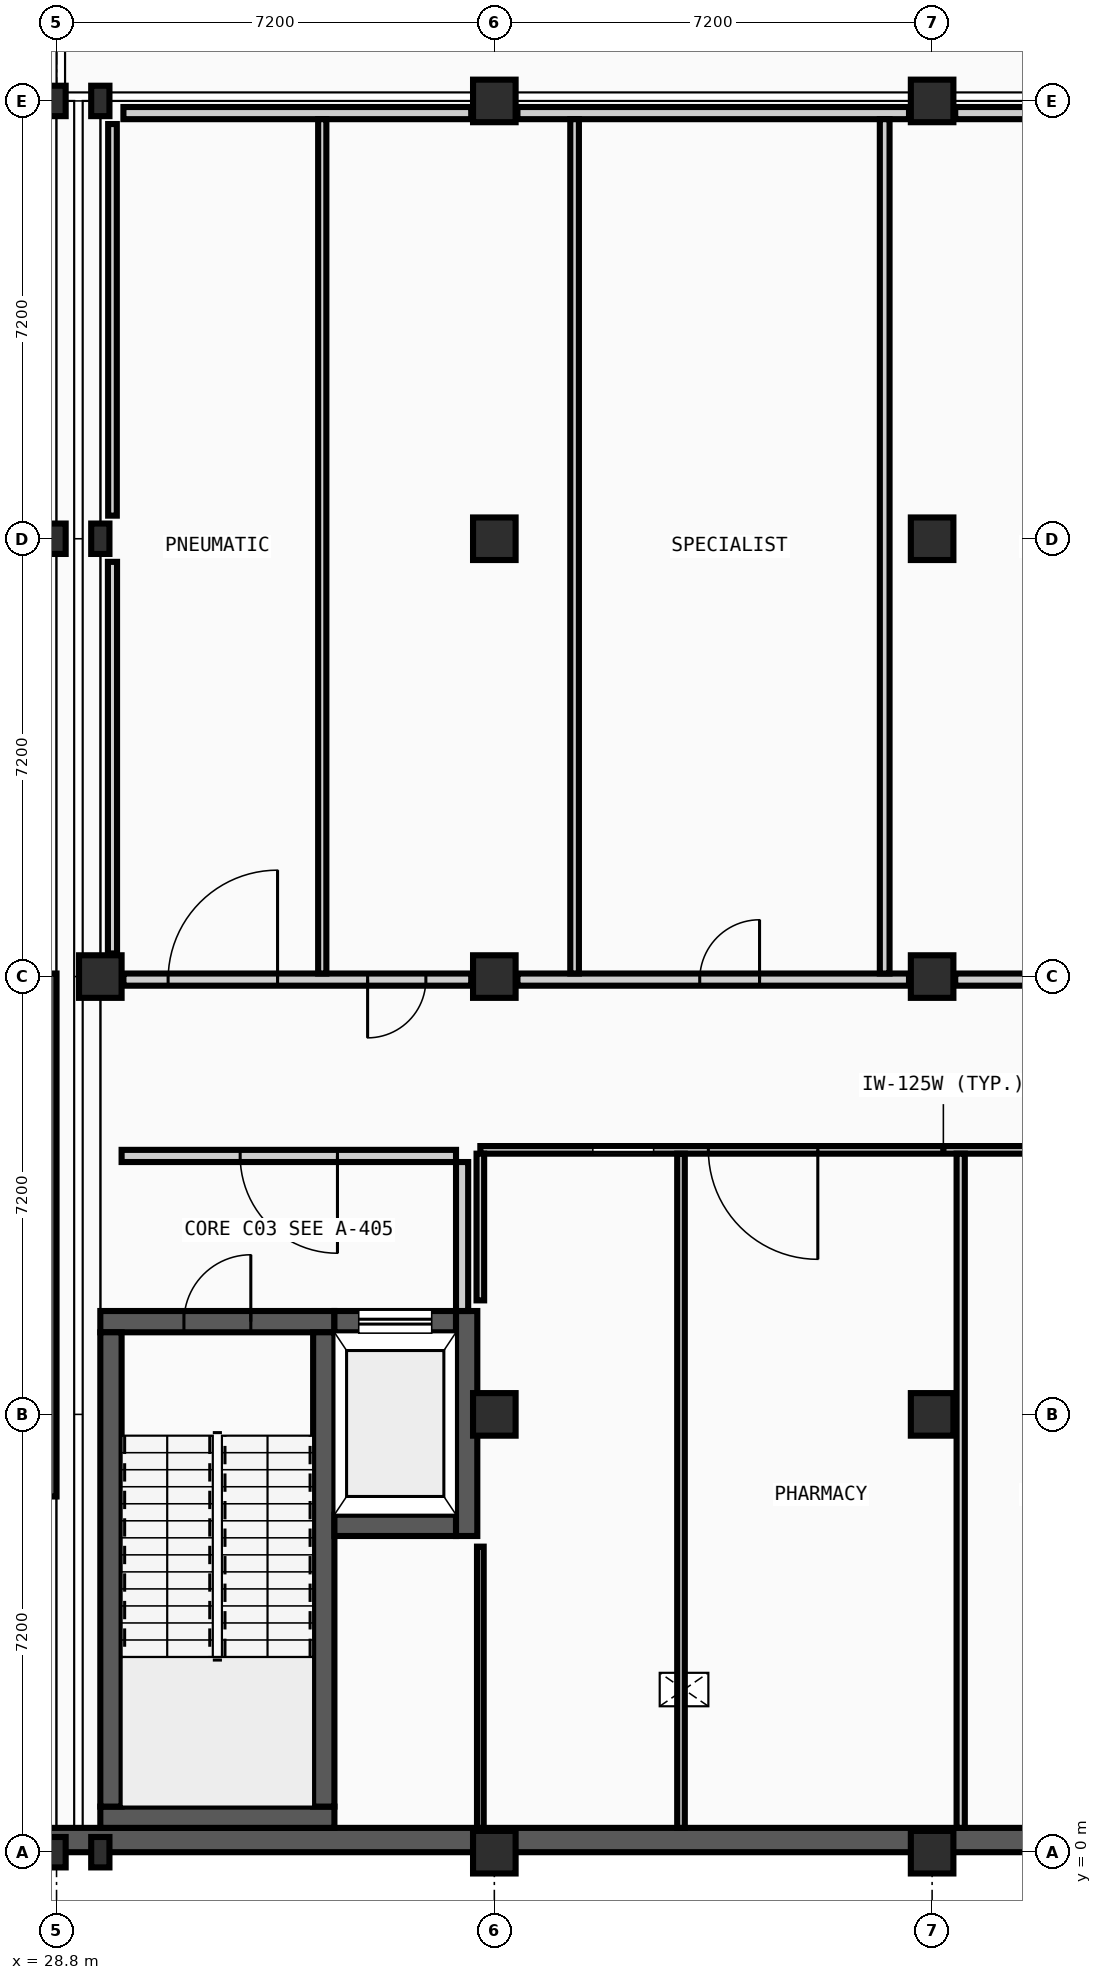
"""IFC4 building model, lengths in metres.
Left out: names, types, materials, properties, quantities, classifications, styles, units other than length and angle.
Written with IfcOpenShell. Run it as: python <this file> out.ifc"""

import sys

from ifc_helpers import new_model, si_unit, direction, frame, frame_2d, origin, origin_2d, place, context, subcontext, project, spatial, rectangle, i_section, extrude, element, fill, save


model = new_model("IFC4")
c1 = context("Model", 3, precision=1e-05, world=origin(), true_north=direction((0.0, 1.0)))
c2 = subcontext(c1, "Body", "Model", "MODEL_VIEW")
j1 = project(units=[si_unit("LENGTHUNIT", "METRE"), si_unit("PLANEANGLEUNIT", "RADIAN")], contexts=[c1])
p1 = place(None, origin())
s1 = spatial("IfcSite", under=j1, at=p1, CompositionType="ELEMENT")
p2 = place(p1, origin())
s2 = spatial("IfcBuilding", under=s1, at=p2, CompositionType="ELEMENT")
p3 = place(p2, frame((0.0, 0.0, -4.8)))
s3 = spatial("IfcBuildingStorey", under=s2, at=p3, CompositionType="ELEMENT", Elevation=-4.8)
for number, where, z_axis, x_axis in (
    (1, (28.8, 0.0, 0.0), (0.0, 0.0, 1.0), (1.0, 0.0, 0.0)),
    (2, (28.8, 21.6, 0.0), (0.0, 0.0, 1.0), (1.0, 0.0, 0.0)),
    (3, (28.8, 28.8, 0.0), (0.0, 0.0, 1.0), (1.0, 0.0, 0.0)),
    (4, (29.52, 0.0, 0.0), (0.0, 0.0, 1.0), (1.0, 0.0, 0.0)),
):
    element("IfcColumn", number, at=place(p3, frame(where, z_axis=z_axis, x_axis=x_axis)), inside=s3, PredefinedType="COLUMN", context=c2, shape_type="SweptSolid", body=[
        extrude(i_section(OverallWidth=0.3, OverallDepth=0.5, WebThickness=0.014, FlangeThickness=0.028, FilletRadius=0.027, at=origin_2d()), origin(), (0.0, 0.0, 1.0), 4.8),
    ])
p4 = place(p3, frame((29.52, 14.4, 0.0), z_axis=(0.0, 0.0, 1.0), x_axis=(1.0, 0.0, 0.0)))
e5 = element("IfcColumn", 5, at=p4, inside=s3, PredefinedType="COLUMN", context=c2, shape_type="SweptSolid", body=[
    extrude(rectangle(XDim=0.7, YDim=0.7, at=origin_2d()), origin(), (0.0, 0.0, 1.0), 4.8),
])
for number, where, z_axis, x_axis in (
    (6, (29.52, 21.6, 0.0), (0.0, 0.0, 1.0), (1.0, 0.0, 0.0)),
    (7, (29.52, 28.8, 0.0), (0.0, 0.0, 1.0), (1.0, 0.0, 0.0)),
):
    element("IfcColumn", number, at=place(p3, frame(where, z_axis=z_axis, x_axis=x_axis)), inside=s3, PredefinedType="COLUMN", context=c2, shape_type="SweptSolid", body=[
        extrude(i_section(OverallWidth=0.3, OverallDepth=0.5, WebThickness=0.014, FlangeThickness=0.028, FilletRadius=0.027, at=origin_2d()), origin(), (0.0, 0.0, 1.0), 4.8),
    ])
for number, where, z_axis, x_axis in (
    (8, (36.0, 0.0, 0.0), (0.0, 0.0, 1.0), (1.0, 0.0, 0.0)),
    (9, (36.0, 7.2, 0.0), (0.0, 0.0, 1.0), (1.0, 0.0, 0.0)),
    (10, (36.0, 14.4, 0.0), (0.0, 0.0, 1.0), (1.0, 0.0, 0.0)),
    (11, (36.0, 21.6, 0.0), (0.0, 0.0, 1.0), (1.0, 0.0, 0.0)),
    (12, (36.0, 28.8, 0.0), (0.0, 0.0, 1.0), (1.0, 0.0, 0.0)),
    (13, (43.2, 0.0, 0.0), (0.0, 0.0, 1.0), (1.0, 0.0, 0.0)),
    (14, (43.2, 7.2, 0.0), (0.0, 0.0, 1.0), (1.0, 0.0, 0.0)),
    (15, (43.2, 14.4, 0.0), (0.0, 0.0, 1.0), (1.0, 0.0, 0.0)),
    (16, (43.2, 21.6, 0.0), (0.0, 0.0, 1.0), (1.0, 0.0, 0.0)),
    (17, (43.2, 28.8, 0.0), (0.0, 0.0, 1.0), (1.0, 0.0, 0.0)),
):
    element("IfcColumn", number, at=place(p3, frame(where, z_axis=z_axis, x_axis=x_axis)), inside=s3, PredefinedType="COLUMN", context=c2, shape_type="SweptSolid", body=[
        extrude(rectangle(XDim=0.7, YDim=0.7, at=origin_2d()), origin(), (0.0, 0.0, 1.0), 4.8),
    ])
p5 = place(p3, frame((0.0, 0.2, 0.0), z_axis=(0.0, 0.0, 1.0), x_axis=(1.0, 0.0, 0.0)))
e18 = element("IfcWall", 18, at=p5, inside=s3, PredefinedType="USERDEFINED", context=c2, shape_type="SweptSolid", body=[
    extrude(rectangle(XDim=86.4, YDim=0.4, at=frame_2d((43.2, 0.0))), origin(), (0.0, 0.0, 1.0), 4.545),
])
p6 = place(p3, frame((28.6, 5.85, 0.0), z_axis=(0.0, 0.0, 1.0), x_axis=(0.0, 1.0, 0.0)))
e19 = element("IfcWall", 19, at=p6, inside=s3, PredefinedType="SHEAR", context=c2, shape_type="SweptSolid", body=[
    extrude(rectangle(XDim=8.6, YDim=0.4, at=frame_2d((4.3, 0.0))), origin(), (0.0, 0.0, 1.0), 4.545),
])
p7 = place(p3, frame((29.52, 0.575, 0.0), z_axis=(0.0, 0.0, 1.0), x_axis=(1.0, 0.0, 0.0)))
e20 = element("IfcWall", 20, at=p7, inside=s3, PredefinedType="SHEAR", context=c2, shape_type="SweptSolid", body=[
    extrude(rectangle(XDim=3.85, YDim=0.35, at=frame_2d((1.925, 0.0))), origin(), (0.0, 0.0, 1.0), 4.545),
])
p8 = place(p3, frame((29.52, 8.725, 0.0), z_axis=(0.0, 0.0, 1.0), x_axis=(1.0, 0.0, 0.0)))
e21 = element("IfcWall", 21, at=p8, inside=s3, PredefinedType="SHEAR", context=c2, shape_type="SweptSolid", body=[
    extrude(rectangle(XDim=3.85, YDim=0.35, at=frame_2d((1.925, 0.0))), origin(), (0.0, 0.0, 1.0), 4.545),
])
p9 = place(p8, frame((1.375, 0.0, 0.0)))
e22 = element("IfcOpeningElement", 22, at=p9, cuts=e21, PredefinedType="OPENING", context=c2, shape_type="SweptSolid", body=[
    extrude(rectangle(XDim=1.1, YDim=2.15, at=frame_2d((0.55, 1.075))), frame((0.0, 0.185, 0.0), z_axis=(0.0, -1.0, 0.0), x_axis=(1.0, 0.0, 0.0)), (0.0, 0.0, 1.0), 0.37),
])
for number, where, z_axis, x_axis in (
    (23, (29.695, 0.75, 0.0), (0.0, 0.0, 1.0), (0.0, 1.0, 0.0)),
    (24, (33.195, 0.75, 0.0), (0.0, 0.0, 1.0), (0.0, 1.0, 0.0)),
):
    element("IfcWall", number, at=place(p3, frame(where, z_axis=z_axis, x_axis=x_axis)), inside=s3, PredefinedType="SHEAR", context=c2, shape_type="SweptSolid", body=[
        extrude(rectangle(XDim=7.8, YDim=0.35, at=frame_2d((3.9, 0.0))), origin(), (0.0, 0.0, 1.0), 4.545),
    ])
p10 = place(p3, frame((33.37, 5.375, 0.0), z_axis=(0.0, 0.0, 1.0), x_axis=(1.0, 0.0, 0.0)))
e25 = element("IfcWall", 25, at=p10, inside=s3, PredefinedType="SHEAR", context=c2, shape_type="SweptSolid", body=[
    extrude(rectangle(XDim=2.0, YDim=0.35, at=frame_2d((1.0, 0.0))), origin(), (0.0, 0.0, 1.0), 4.545),
])
p11 = place(p3, frame((33.37, 8.725, 0.0), z_axis=(0.0, 0.0, 1.0), x_axis=(1.0, 0.0, 0.0)))
e26 = element("IfcWall", 26, at=p11, inside=s3, PredefinedType="SHEAR", context=c2, shape_type="SweptSolid", body=[
    extrude(rectangle(XDim=2.0, YDim=0.35, at=frame_2d((1.0, 0.0))), origin(), (0.0, 0.0, 1.0), 4.545),
])
p12 = place(p11, frame((0.4, 0.0, 0.0)))
e27 = element("IfcOpeningElement", 27, at=p12, cuts=e26, PredefinedType="OPENING", context=c2, shape_type="SweptSolid", body=[
    extrude(rectangle(XDim=1.2, YDim=2.2, at=frame_2d((0.6, 1.1))), frame((0.0, 0.185, 0.0), z_axis=(0.0, -1.0, 0.0), x_axis=(1.0, 0.0, 0.0)), (0.0, 0.0, 1.0), 0.37),
])
p13 = place(p3, frame((35.545, 5.2, 0.0), z_axis=(0.0, 0.0, 1.0), x_axis=(0.0, 1.0, 0.0)))
e28 = element("IfcWall", 28, at=p13, inside=s3, PredefinedType="SHEAR", context=c2, shape_type="SweptSolid", body=[
    extrude(rectangle(XDim=3.7, YDim=0.35, at=frame_2d((1.85, 0.0))), origin(), (0.0, 0.0, 1.0), 4.545),
])
p14 = place(p3, frame((29.87, 11.45, 0.0), z_axis=(0.0, 0.0, 1.0), x_axis=(1.0, 0.0, 0.0)))
e29 = element("IfcWall", 29, at=p14, inside=s3, PredefinedType="PARTITIONING", context=c2, shape_type="SweptSolid", body=[
    extrude(rectangle(XDim=5.5, YDim=0.2, at=frame_2d((2.75, 0.0))), origin(), (0.0, 0.0, 1.0), 4.545),
])
p15 = place(p14, frame((1.95, 0.0, 0.0)))
e30 = element("IfcOpeningElement", 30, at=p15, cuts=e29, PredefinedType="OPENING", context=c2, shape_type="SweptSolid", body=[
    extrude(rectangle(XDim=1.6, YDim=2.2, at=frame_2d((0.8, 1.1))), frame((0.0, 0.11, 0.0), z_axis=(0.0, -1.0, 0.0), x_axis=(1.0, 0.0, 0.0)), (0.0, 0.0, 1.0), 0.22),
])
p16 = place(p3, frame((35.47, 8.9, 0.0), z_axis=(0.0, 0.0, 1.0), x_axis=(0.0, 1.0, 0.0)))
e31 = element("IfcWall", 31, at=p16, inside=s3, PredefinedType="PARTITIONING", context=c2, shape_type="SweptSolid", body=[
    extrude(rectangle(XDim=2.45, YDim=0.2, at=frame_2d((1.225, 0.0))), origin(), (0.0, 0.0, 1.0), 4.545),
])
p17 = place(p3, frame((35.77, 11.55, 0.0), z_axis=(0.0, 0.0, 1.0), x_axis=(1.0, 0.0, 0.0)))
e32 = element("IfcWall", 32, at=p17, inside=s3, PredefinedType="PARTITIONING", context=c2, shape_type="SweptSolid", body=[
    extrude(rectangle(XDim=15.23, YDim=0.125, at=frame_2d((7.615, 0.0))), origin(), (0.0, 0.0, 1.0), 4.545),
])
p18 = place(p17, frame((1.85, 0.0, 0.0)))
e33 = element("IfcOpeningElement", 33, at=p18, cuts=e32, PredefinedType="OPENING", context=c2, shape_type="SweptSolid", body=[
    extrude(rectangle(XDim=1.0, YDim=2.1, at=frame_2d((0.5, 1.05))), frame((0.0, 0.073, 0.0), z_axis=(0.0, -1.0, 0.0), x_axis=(1.0, 0.0, 0.0)), (0.0, 0.0, 1.0), 0.145),
])
p19 = place(p17, frame((3.75, 0.0, 0.0)))
e34 = element("IfcOpeningElement", 34, at=p19, cuts=e32, PredefinedType="OPENING", context=c2, shape_type="SweptSolid", body=[
    extrude(rectangle(XDim=1.8, YDim=2.3, at=frame_2d((0.9, 1.15))), frame((0.0, 0.073, 0.0), z_axis=(0.0, -1.0, 0.0), x_axis=(1.0, 0.0, 0.0)), (0.0, 0.0, 1.0), 0.145),
])
p20 = place(p17, frame((11.047, 0.0, 0.0)))
e35 = element("IfcOpeningElement", 35, at=p20, cuts=e32, PredefinedType="OPENING", context=c2, shape_type="SweptSolid", body=[
    extrude(rectangle(XDim=1.036, YDim=2.04, at=frame_2d((0.518, 1.02))), frame((0.0, 0.073, 0.0), z_axis=(0.0, -1.0, 0.0), x_axis=(1.0, 0.0, 0.0)), (0.0, 0.0, 1.0), 0.145),
])
p21 = place(p3, frame((29.9, 14.35, 0.0), z_axis=(0.0, 0.0, 1.0), x_axis=(1.0, 0.0, 0.0)))
e36 = element("IfcWall", 36, at=p21, inside=s3, PredefinedType="PARTITIONING", context=c2, shape_type="SweptSolid", body=[
    extrude(rectangle(XDim=5.72, YDim=0.2, at=frame_2d((2.86, 0.0))), origin(), (0.0, 0.0, 1.0), 4.095),
])
p22 = place(p21, frame((0.735, 0.0, 0.0)))
e37 = element("IfcOpeningElement", 37, at=p22, cuts=e36, PredefinedType="OPENING", context=c2, shape_type="SweptSolid", body=[
    extrude(rectangle(XDim=1.8, YDim=2.3, at=frame_2d((0.9, 1.15))), frame((0.0, 0.11, 0.0), z_axis=(0.0, -1.0, 0.0), x_axis=(1.0, 0.0, 0.0)), (0.0, 0.0, 1.0), 0.22),
])
p23 = place(p21, frame((4.016, 0.0, 0.0)))
e38 = element("IfcOpeningElement", 38, at=p23, cuts=e36, PredefinedType="OPENING", context=c2, shape_type="SweptSolid", body=[
    extrude(rectangle(XDim=0.958, YDim=2.04, at=frame_2d((0.479, 1.02))), frame((0.0, 0.11, 0.0), z_axis=(0.0, -1.0, 0.0), x_axis=(1.0, 0.0, 0.0)), (0.0, 0.0, 1.0), 0.22),
])
p24 = place(p3, frame((36.38, 14.35, 0.0), z_axis=(0.0, 0.0, 1.0), x_axis=(1.0, 0.0, 0.0)))
e39 = element("IfcWall", 39, at=p24, inside=s3, PredefinedType="PARTITIONING", context=c2, shape_type="SweptSolid", body=[
    extrude(rectangle(XDim=6.44, YDim=0.2, at=frame_2d((3.22, 0.0))), origin(), (0.0, 0.0, 1.0), 4.095),
])
p25 = place(p24, frame((2.998, 0.0, 0.0)))
e40 = element("IfcOpeningElement", 40, at=p25, cuts=e39, PredefinedType="OPENING", context=c2, shape_type="SweptSolid", body=[
    extrude(rectangle(XDim=0.984, YDim=2.04, at=frame_2d((0.492, 1.02))), frame((0.0, 0.11, 0.0), z_axis=(0.0, -1.0, 0.0), x_axis=(1.0, 0.0, 0.0)), (0.0, 0.0, 1.0), 0.22),
])
p26 = place(p3, frame((43.58, 14.35, 0.0), z_axis=(0.0, 0.0, 1.0), x_axis=(1.0, 0.0, 0.0)))
e41 = element("IfcWall", 41, at=p26, inside=s3, PredefinedType="PARTITIONING", context=c2, shape_type="SweptSolid", body=[
    extrude(rectangle(XDim=6.44, YDim=0.2, at=frame_2d((3.22, 0.0))), origin(), (0.0, 0.0, 1.0), 4.095),
])
p27 = place(p26, frame((2.089, 0.0, 0.0)))
e42 = element("IfcOpeningElement", 42, at=p27, cuts=e41, PredefinedType="OPENING", context=c2, shape_type="SweptSolid", body=[
    extrude(rectangle(XDim=1.062, YDim=2.04, at=frame_2d((0.531, 1.02))), frame((0.0, 0.11, 0.0), z_axis=(0.0, -1.0, 0.0), x_axis=(1.0, 0.0, 0.0)), (0.0, 0.0, 1.0), 0.22),
])
p28 = place(p3, frame((29.9, 28.6, 0.0), z_axis=(0.0, 0.0, 1.0), x_axis=(1.0, 0.0, 0.0)))
e43 = element("IfcWall", 43, at=p28, inside=s3, PredefinedType="PARTITIONING", context=c2, shape_type="SweptSolid", body=[
    extrude(rectangle(XDim=5.72, YDim=0.2, at=frame_2d((2.86, 0.0))), origin(), (0.0, 0.0, 1.0), 4.095),
])
p29 = place(p3, frame((36.38, 28.6, 0.0), z_axis=(0.0, 0.0, 1.0), x_axis=(1.0, 0.0, 0.0)))
e44 = element("IfcWall", 44, at=p29, inside=s3, PredefinedType="PARTITIONING", context=c2, shape_type="SweptSolid", body=[
    extrude(rectangle(XDim=6.44, YDim=0.2, at=frame_2d((3.22, 0.0))), origin(), (0.0, 0.0, 1.0), 4.095),
])
p30 = place(p3, frame((43.58, 28.6, 0.0), z_axis=(0.0, 0.0, 1.0), x_axis=(1.0, 0.0, 0.0)))
e45 = element("IfcWall", 45, at=p30, inside=s3, PredefinedType="PARTITIONING", context=c2, shape_type="SweptSolid", body=[
    extrude(rectangle(XDim=6.44, YDim=0.2, at=frame_2d((3.22, 0.0))), origin(), (0.0, 0.0, 1.0), 4.095),
])
p31 = place(p3, frame((29.72, 14.78, 0.0), z_axis=(0.0, 0.0, 1.0), x_axis=(0.0, 1.0, 0.0)))
e46 = element("IfcWall", 46, at=p31, inside=s3, PredefinedType="PARTITIONING", context=c2, shape_type="SweptSolid", body=[
    extrude(rectangle(XDim=6.44, YDim=0.15, at=frame_2d((3.22, 0.0))), origin(), (0.0, 0.0, 1.0), 4.245),
])
p32 = place(p3, frame((29.72, 21.98, 0.0), z_axis=(0.0, 0.0, 1.0), x_axis=(0.0, 1.0, 0.0)))
e47 = element("IfcWall", 47, at=p32, inside=s3, PredefinedType="PARTITIONING", context=c2, shape_type="SweptSolid", body=[
    extrude(rectangle(XDim=6.44, YDim=0.142, at=frame_2d((3.22, 0.0))), origin(), (0.0, 0.0, 1.0), 4.245),
])
p33 = place(p3, frame((33.17, 14.45, 0.0), z_axis=(0.0, 0.0, 1.0), x_axis=(0.0, 1.0, 0.0)))
e48 = element("IfcWall", 48, at=p33, inside=s3, PredefinedType="PARTITIONING", context=c2, shape_type="SweptSolid", body=[
    extrude(rectangle(XDim=14.05, YDim=0.135, at=frame_2d((7.025, 0.0))), origin(), (0.0, 0.0, 1.0), 4.545),
])
p34 = place(p3, frame((35.77, 0.4, 0.0), z_axis=(0.0, 0.0, 1.0), x_axis=(0.0, 1.0, 0.0)))
e49 = element("IfcWall", 49, at=p34, inside=s3, PredefinedType="PARTITIONING", context=c2, shape_type="SweptSolid", body=[
    extrude(rectangle(XDim=4.625, YDim=0.11, at=frame_2d((2.312, 0.0))), origin(), (0.0, 0.0, 1.0), 4.245),
])
p35 = place(p3, frame((35.77, 9.075, 0.0), z_axis=(0.0, 0.0, 1.0), x_axis=(0.0, 1.0, 0.0)))
e50 = element("IfcWall", 50, at=p35, inside=s3, PredefinedType="PARTITIONING", context=c2, shape_type="SweptSolid", body=[
    extrude(rectangle(XDim=2.413, YDim=0.125, at=frame_2d((1.206, 0.0))), origin(), (0.0, 0.0, 1.0), 4.245),
])
p36 = place(p3, frame((37.32, 14.45, 0.0), z_axis=(0.0, 0.0, 1.0), x_axis=(0.0, 1.0, 0.0)))
e51 = element("IfcWall", 51, at=p36, inside=s3, PredefinedType="PARTITIONING", context=c2, shape_type="SweptSolid", body=[
    extrude(rectangle(XDim=14.05, YDim=0.142, at=frame_2d((7.025, 0.0))), origin(), (0.0, 0.0, 1.0), 4.545),
])
p37 = place(p3, frame((39.07, 0.4, 0.0), z_axis=(0.0, 0.0, 1.0), x_axis=(0.0, 1.0, 0.0)))
e52 = element("IfcWall", 52, at=p37, inside=s3, PredefinedType="PARTITIONING", context=c2, shape_type="SweptSolid", body=[
    extrude(rectangle(XDim=11.088, YDim=0.125, at=frame_2d((5.544, 0.0))), origin(), (0.0, 0.0, 1.0), 4.545),
])
p38 = place(p3, frame((42.42, 14.45, 0.0), z_axis=(0.0, 0.0, 1.0), x_axis=(0.0, 1.0, 0.0)))
e53 = element("IfcWall", 53, at=p38, inside=s3, PredefinedType="PARTITIONING", context=c2, shape_type="SweptSolid", body=[
    extrude(rectangle(XDim=14.05, YDim=0.16, at=frame_2d((7.025, 0.0))), origin(), (0.0, 0.0, 1.0), 4.545),
])
p39 = place(p3, frame((43.67, 0.4, 0.0), z_axis=(0.0, 0.0, 1.0), x_axis=(0.0, 1.0, 0.0)))
e54 = element("IfcWall", 54, at=p39, inside=s3, PredefinedType="PARTITIONING", context=c2, shape_type="SweptSolid", body=[
    extrude(rectangle(XDim=11.088, YDim=0.135, at=frame_2d((5.544, 0.0))), origin(), (0.0, 0.0, 1.0), 4.545),
])
p40 = place(p9, frame((1.1, 0.0, 0.0), z_axis=(0.0, 0.0, 1.0), x_axis=(-1.0, 0.0, 0.0)))
e55 = element("IfcDoor", 55, at=p40, inside=s3, OperationType="SINGLE_SWING_RIGHT", PredefinedType="DOOR", context=c2, shape_type="SweptSolid", body=[
    extrude(rectangle(XDim=1.1, YDim=2.15, at=frame_2d((0.55, 1.075))), frame((0.0, 0.025, 0.0), z_axis=(0.0, -1.0, 0.0), x_axis=(1.0, 0.0, 0.0)), (0.0, 0.0, 1.0), 0.05),
])
fill(e22, e55)
p41 = place(p12, origin())
e56 = element("IfcDoor", 56, at=p41, inside=s3, OperationType="SLIDING_TO_RIGHT", PredefinedType="DOOR", context=c2, shape_type="SweptSolid", body=[
    extrude(rectangle(XDim=1.2, YDim=2.2, at=frame_2d((0.6, 1.1))), frame((0.0, 0.025, 0.0), z_axis=(0.0, -1.0, 0.0), x_axis=(1.0, 0.0, 0.0)), (0.0, 0.0, 1.0), 0.05),
])
fill(e27, e56)
p42 = place(p15, origin())
e57 = element("IfcDoor", 57, at=p42, inside=s3, OperationType="DOUBLE_DOOR_SINGLE_SWING", PredefinedType="DOOR", context=c2, shape_type="SweptSolid", body=[
    extrude(rectangle(XDim=1.6, YDim=2.2, at=frame_2d((0.8, 1.1))), frame((0.0, 0.025, 0.0), z_axis=(0.0, -1.0, 0.0), x_axis=(1.0, 0.0, 0.0)), (0.0, 0.0, 1.0), 0.05),
])
fill(e30, e57)
p43 = place(p18, origin())
e58 = element("IfcDoor", 58, at=p43, inside=s3, OperationType="SLIDING_TO_LEFT", PredefinedType="DOOR", context=c2, shape_type="SweptSolid", body=[
    extrude(rectangle(XDim=1.0, YDim=2.1, at=frame_2d((0.5, 1.05))), frame((0.0, 0.025, 0.0), z_axis=(0.0, -1.0, 0.0), x_axis=(1.0, 0.0, 0.0)), (0.0, 0.0, 1.0), 0.05),
])
fill(e33, e58)
p44 = place(p22, frame((1.8, 0.0, 0.0), z_axis=(0.0, 0.0, 1.0), x_axis=(-1.0, 0.0, 0.0)))
e59 = element("IfcDoor", 59, at=p44, inside=s3, OperationType="DOUBLE_DOOR_SINGLE_SWING", PredefinedType="DOOR", context=c2, shape_type="SweptSolid", body=[
    extrude(rectangle(XDim=1.8, YDim=2.3, at=frame_2d((0.9, 1.15))), frame((0.0, 0.025, 0.0), z_axis=(0.0, -1.0, 0.0), x_axis=(1.0, 0.0, 0.0)), (0.0, 0.0, 1.0), 0.05),
])
fill(e37, e59)
p45 = place(p19, origin())
e60 = element("IfcDoor", 60, at=p45, inside=s3, OperationType="DOUBLE_DOOR_SINGLE_SWING", PredefinedType="DOOR", context=c2, shape_type="SweptSolid", body=[
    extrude(rectangle(XDim=1.8, YDim=2.3, at=frame_2d((0.9, 1.15))), frame((0.0, 0.025, 0.0), z_axis=(0.0, -1.0, 0.0), x_axis=(1.0, 0.0, 0.0)), (0.0, 0.0, 1.0), 0.05),
])
fill(e34, e60)
p46 = place(p23, frame((0.958, 0.0, 0.0), z_axis=(0.0, 0.0, 1.0), x_axis=(-1.0, 0.0, 0.0)))
e61 = element("IfcDoor", 61, at=p46, inside=s3, OperationType="SINGLE_SWING_LEFT", PredefinedType="DOOR", context=c2, shape_type="SweptSolid", body=[
    extrude(rectangle(XDim=0.958, YDim=2.04, at=frame_2d((0.479, 1.02))), frame((0.0, 0.025, 0.0), z_axis=(0.0, -1.0, 0.0), x_axis=(1.0, 0.0, 0.0)), (0.0, 0.0, 1.0), 0.05),
])
fill(e38, e61)
p47 = place(p25, frame((0.984, 0.0, 0.0), z_axis=(0.0, 0.0, 1.0), x_axis=(-1.0, 0.0, 0.0)))
e62 = element("IfcDoor", 62, at=p47, inside=s3, OperationType="SINGLE_SWING_RIGHT", PredefinedType="DOOR", context=c2, shape_type="SweptSolid", body=[
    extrude(rectangle(XDim=0.984, YDim=2.04, at=frame_2d((0.492, 1.02))), frame((0.0, 0.025, 0.0), z_axis=(0.0, -1.0, 0.0), x_axis=(1.0, 0.0, 0.0)), (0.0, 0.0, 1.0), 0.05),
])
fill(e40, e62)
save(model, sys.argv[1])
